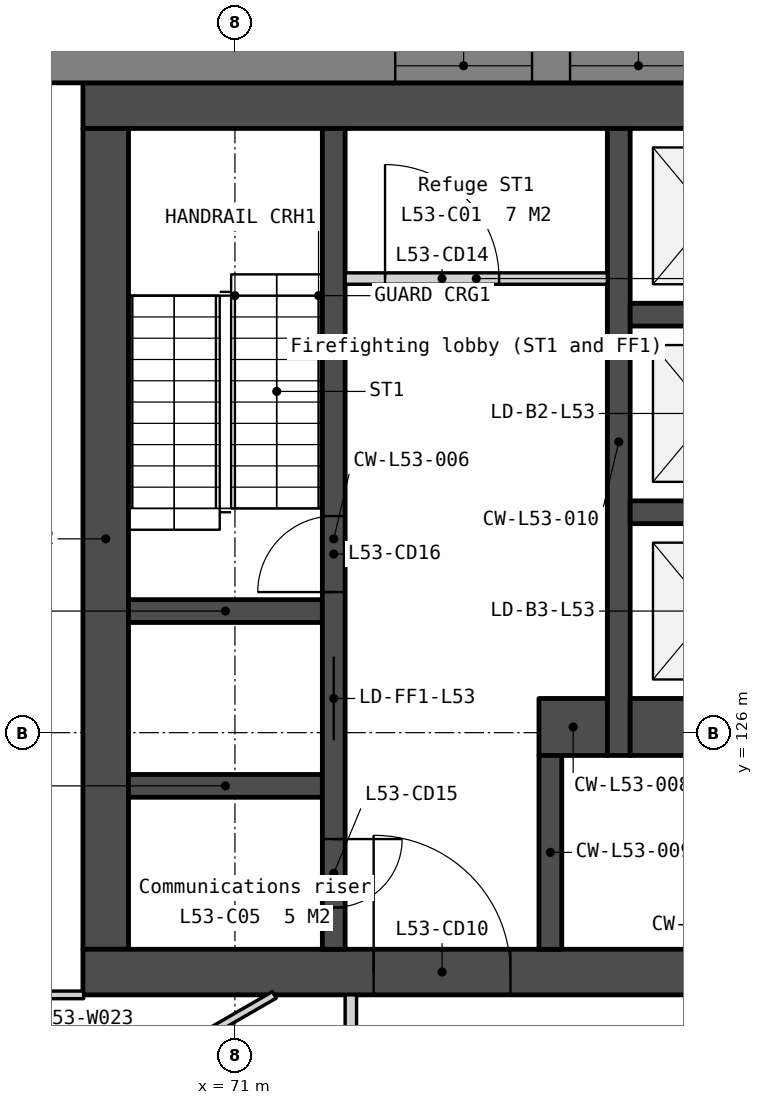
"""IFC4 building model, lengths in metres.
Left out: names, types, materials, properties, quantities, classifications, styles, units other than length and angle.
Written with IfcOpenShell. Run it as: python <this file> out.ifc"""

import sys

from ifc_helpers import new_model, si_unit, direction, frame, frame_2d, origin, place, context, subcontext, project, spatial, polyline, rectangle, outline, extrude, element, fill, save


model = new_model("IFC4")
c1 = context("Model", 3, precision=1e-05, world=origin(), true_north=direction((0.0, 1.0)))
c2 = subcontext(c1, "Body", "Model", "MODEL_VIEW")
j1 = project(units=[si_unit("LENGTHUNIT", "METRE"), si_unit("PLANEANGLEUNIT", "RADIAN")], contexts=[c1])
p1 = place(None, origin())
s1 = spatial("IfcSite", under=j1, at=p1, CompositionType="ELEMENT")
p2 = place(p1, origin())
s2 = spatial("IfcBuilding", under=s1, at=p2, CompositionType="ELEMENT")
p3 = place(p2, frame((0.0, 0.0, 211.4)))
s3 = spatial("IfcBuildingStorey", under=s2, at=p3, CompositionType="ELEMENT", Elevation=211.4)
p4 = place(p3, frame((69.0, 134.25, 0.0), z_axis=(0.0, 0.0, 1.0), x_axis=(1.0, 0.0, 0.0)))
e1 = element("IfcWall", 1, at=p4, inside=s3, PredefinedType="SOLIDWALL", context=c2, shape_type="SweptSolid", body=[
    extrude(rectangle(XDim=22.0, YDim=0.6, at=frame_2d((11.0, 0.0))), origin(), (0.0, 0.0, 1.0), 3.75),
])
p5 = place(p3, frame((69.3, 133.95, 0.0), z_axis=(0.0, 0.0, 1.0), x_axis=(0.0, -1.0, 0.0)))
e2 = element("IfcWall", 2, at=p5, inside=s3, PredefinedType="SOLIDWALL", context=c2, shape_type="SweptSolid", body=[
    extrude(rectangle(XDim=10.8, YDim=0.6, at=frame_2d((5.4, 0.0))), origin(), (0.0, 0.0, 1.0), 3.75),
])
p6 = place(p3, frame((69.0, 122.85, 0.0), z_axis=(0.0, 0.0, 1.0), x_axis=(1.0, 0.0, 0.0)))
e3 = element("IfcWall", 3, at=p6, inside=s3, PredefinedType="SOLIDWALL", context=c2, shape_type="SweptSolid", body=[
    extrude(rectangle(XDim=22.0, YDim=0.6, at=frame_2d((11.0, 0.0))), origin(), (0.0, 0.0, 1.0), 3.75),
])
p7 = place(p6, frame((16.375, 0.0, 0.0)))
e4 = element("IfcOpeningElement", 4, at=p7, cuts=e3, PredefinedType="OPENING", context=c2, shape_type="SweptSolid", body=[
    extrude(rectangle(XDim=1.8, YDim=2.1, at=frame_2d((0.9, 1.05))), frame((0.0, 0.31, 0.0), z_axis=(0.0, -1.0, 0.0), x_axis=(1.0, 0.0, 0.0)), (0.0, 0.0, 1.0), 0.62),
])
p8 = place(p6, frame((3.825, 0.0, 0.0)))
e5 = element("IfcOpeningElement", 5, at=p8, cuts=e3, PredefinedType="OPENING", context=c2, shape_type="SweptSolid", body=[
    extrude(rectangle(XDim=1.8, YDim=2.1, at=frame_2d((0.9, 1.05))), frame((0.0, 0.31, 0.0), z_axis=(0.0, -1.0, 0.0), x_axis=(1.0, 0.0, 0.0)), (0.0, 0.0, 1.0), 0.62),
])
p9 = place(p6, frame((12.85, 0.0, 0.0)))
e6 = element("IfcOpeningElement", 6, at=p9, cuts=e3, PredefinedType="OPENING", context=c2, shape_type="SweptSolid", body=[
    extrude(rectangle(XDim=1.5, YDim=2.1, at=frame_2d((0.75, 1.05))), frame((0.0, 0.31, 0.0), z_axis=(0.0, -1.0, 0.0), x_axis=(1.0, 0.0, 0.0)), (0.0, 0.0, 1.0), 0.62),
])
for number, where, z_axis, x_axis in (
    (7, (69.6, 127.6, 0.0), (0.0, 0.0, 1.0), (1.0, 0.0, 0.0)),
    (8, (69.6, 125.3, 0.0), (0.0, 0.0, 1.0), (1.0, 0.0, 0.0)),
):
    element("IfcWall", number, at=place(p3, frame(where, z_axis=z_axis, x_axis=x_axis)), inside=s3, PredefinedType="SOLIDWALL", context=c2, shape_type="SweptSolid", body=[
        extrude(rectangle(XDim=2.55, YDim=0.3, at=frame_2d((1.275, 0.0))), origin(), (0.0, 0.0, 1.0), 3.75),
    ])
p10 = place(p3, frame((72.3, 133.95, 0.0), z_axis=(0.0, 0.0, 1.0), x_axis=(0.0, -1.0, 0.0)))
e9 = element("IfcWall", 9, at=p10, inside=s3, PredefinedType="SOLIDWALL", context=c2, shape_type="SweptSolid", body=[
    extrude(rectangle(XDim=10.8, YDim=0.3, at=frame_2d((5.4, 0.0))), origin(), (0.0, 0.0, 1.0), 3.75),
])
p11 = place(p10, frame((6.95, 0.0, 0.0)))
e10 = element("IfcOpeningElement", 10, at=p11, cuts=e9, PredefinedType="OPENING", context=c2, shape_type="SweptSolid", body=[
    extrude(rectangle(XDim=1.1, YDim=2.1, at=frame_2d((0.55, 1.05))), frame((0.0, 0.16, 0.0), z_axis=(0.0, -1.0, 0.0), x_axis=(1.0, 0.0, 0.0)), (0.0, 0.0, 1.0), 0.32),
])
p12 = place(p10, frame((9.35, 0.0, 0.0)))
e11 = element("IfcOpeningElement", 11, at=p12, cuts=e9, PredefinedType="OPENING", context=c2, shape_type="SweptSolid", body=[
    extrude(rectangle(XDim=0.9, YDim=2.1, at=frame_2d((0.45, 1.05))), frame((0.0, 0.16, 0.0), z_axis=(0.0, -1.0, 0.0), x_axis=(1.0, 0.0, 0.0)), (0.0, 0.0, 1.0), 0.32),
])
p13 = place(p10, frame((5.1, 0.0, 0.0)))
e12 = element("IfcOpeningElement", 12, at=p13, cuts=e9, PredefinedType="OPENING", context=c2, shape_type="SweptSolid", body=[
    extrude(rectangle(XDim=1.0, YDim=2.1, at=frame_2d((0.5, 1.05))), frame((0.0, 0.16, 0.0), z_axis=(0.0, -1.0, 0.0), x_axis=(1.0, 0.0, 0.0)), (0.0, 0.0, 1.0), 0.32),
])
p14 = place(p3, frame((72.45, 131.975, 0.0), z_axis=(0.0, 0.0, 1.0), x_axis=(1.0, 0.0, 0.0)))
e13 = element("IfcWall", 13, at=p14, inside=s3, PredefinedType="PARTITIONING", context=c2, shape_type="SweptSolid", body=[
    extrude(rectangle(XDim=3.45, YDim=0.15, at=frame_2d((1.725, 0.0))), origin(), (0.0, 0.0, 1.0), 3.75),
])
p15 = place(p14, frame((0.525, 0.0, 0.0)))
e14 = element("IfcOpeningElement", 14, at=p15, cuts=e13, PredefinedType="OPENING", context=c2, shape_type="SweptSolid", body=[
    extrude(rectangle(XDim=1.5, YDim=2.1, at=frame_2d((0.75, 1.05))), frame((0.0, 0.085, 0.0), z_axis=(0.0, -1.0, 0.0), x_axis=(1.0, 0.0, 0.0)), (0.0, 0.0, 1.0), 0.17),
])
p16 = place(p3, frame((75.0, 126.075, 0.0), z_axis=(0.0, 0.0, 1.0), x_axis=(1.0, 0.0, 0.0)))
e15 = element("IfcWall", 15, at=p16, inside=s3, PredefinedType="SOLIDWALL", context=c2, shape_type="SweptSolid", body=[
    extrude(rectangle(XDim=0.9, YDim=0.75, at=frame_2d((0.45, 0.0))), origin(), (0.0, 0.0, 1.0), 3.75),
])
p17 = place(p3, frame((75.15, 125.7, 0.0), z_axis=(0.0, 0.0, 1.0), x_axis=(0.0, -1.0, 0.0)))
e16 = element("IfcWall", 16, at=p17, inside=s3, PredefinedType="SOLIDWALL", context=c2, shape_type="SweptSolid", body=[
    extrude(rectangle(XDim=2.55, YDim=0.3, at=frame_2d((1.275, 0.0))), origin(), (0.0, 0.0, 1.0), 3.75),
])
p18 = place(p3, frame((76.05, 133.95, 0.0), z_axis=(0.0, 0.0, 1.0), x_axis=(0.0, -1.0, 0.0)))
e17 = element("IfcWall", 17, at=p18, inside=s3, PredefinedType="SOLIDWALL", context=c2, shape_type="SweptSolid", body=[
    extrude(rectangle(XDim=8.25, YDim=0.3, at=frame_2d((4.125, 0.0))), origin(), (0.0, 0.0, 1.0), 3.75),
])
for number, where, z_axis, x_axis in (
    (18, (76.2, 131.5, 0.0), (0.0, 0.0, 1.0), (1.0, 0.0, 0.0)),
    (19, (76.2, 128.9, 0.0), (0.0, 0.0, 1.0), (1.0, 0.0, 0.0)),
):
    element("IfcWall", number, at=place(p3, frame(where, z_axis=z_axis, x_axis=x_axis)), inside=s3, PredefinedType="SOLIDWALL", context=c2, shape_type="SweptSolid", body=[
        extrude(rectangle(XDim=2.1, YDim=0.3, at=frame_2d((1.05, 0.0))), origin(), (0.0, 0.0, 1.0), 3.75),
    ])
p19 = place(p3, frame((76.2, 126.075, 0.0), z_axis=(0.0, 0.0, 1.0), x_axis=(1.0, 0.0, 0.0)))
e20 = element("IfcWall", 20, at=p19, inside=s3, PredefinedType="SOLIDWALL", context=c2, shape_type="SweptSolid", body=[
    extrude(rectangle(XDim=2.1, YDim=0.75, at=frame_2d((1.05, 0.0))), origin(), (0.0, 0.0, 1.0), 3.75),
])
p20 = place(p3, frame((99.365, 134.775, -0.15), z_axis=(0.0, 0.0, 1.0), x_axis=(-1.0, 0.0, 0.0)))
e21 = element("IfcWall", 21, at=p20, inside=s3, PredefinedType="SOLIDWALL", context=c2, shape_type="SweptSolid", body=[
    extrude(outline(polyline([(38.729, 0.0), (38.729, 3.9), (0.0, 3.9), (0.0, 0.0), (38.729, 0.0)])), frame((0.0, 0.225, 0.0), z_axis=(0.0, -1.0, 0.0), x_axis=(1.0, 0.0, 0.0)), (0.0, 0.0, 1.0), 0.45),
])
p21 = place(p20, frame((2.791, 0.0, 0.95)))
e22 = element("IfcOpeningElement", 22, at=p21, cuts=e21, PredefinedType="OPENING", context=c2, shape_type="SweptSolid", body=[
    extrude(rectangle(XDim=1.8, YDim=2.2, at=frame_2d((0.9, 1.1))), frame((0.0, 0.235, 0.0), z_axis=(0.0, -1.0, 0.0), x_axis=(1.0, 0.0, 0.0)), (0.0, 0.0, 1.0), 0.47),
])
p22 = place(p20, frame((5.091, 0.0, 0.95)))
e23 = element("IfcOpeningElement", 23, at=p22, cuts=e21, PredefinedType="OPENING", context=c2, shape_type="SweptSolid", body=[
    extrude(rectangle(XDim=1.8, YDim=2.2, at=frame_2d((0.9, 1.1))), frame((0.0, 0.235, 0.0), z_axis=(0.0, -1.0, 0.0), x_axis=(1.0, 0.0, 0.0)), (0.0, 0.0, 1.0), 0.47),
])
p23 = place(p20, frame((12.473, 0.0, 0.95)))
e24 = element("IfcOpeningElement", 24, at=p23, cuts=e21, PredefinedType="OPENING", context=c2, shape_type="SweptSolid", body=[
    extrude(rectangle(XDim=1.8, YDim=2.2, at=frame_2d((0.9, 1.1))), frame((0.0, 0.235, 0.0), z_axis=(0.0, -1.0, 0.0), x_axis=(1.0, 0.0, 0.0)), (0.0, 0.0, 1.0), 0.47),
])
p24 = place(p20, frame((14.773, 0.0, 0.95)))
e25 = element("IfcOpeningElement", 25, at=p24, cuts=e21, PredefinedType="OPENING", context=c2, shape_type="SweptSolid", body=[
    extrude(rectangle(XDim=1.8, YDim=2.2, at=frame_2d((0.9, 1.1))), frame((0.0, 0.235, 0.0), z_axis=(0.0, -1.0, 0.0), x_axis=(1.0, 0.0, 0.0)), (0.0, 0.0, 1.0), 0.47),
])
p25 = place(p20, frame((22.156, 0.0, 0.95)))
e26 = element("IfcOpeningElement", 26, at=p25, cuts=e21, PredefinedType="OPENING", context=c2, shape_type="SweptSolid", body=[
    extrude(rectangle(XDim=1.8, YDim=2.2, at=frame_2d((0.9, 1.1))), frame((0.0, 0.235, 0.0), z_axis=(0.0, -1.0, 0.0), x_axis=(1.0, 0.0, 0.0)), (0.0, 0.0, 1.0), 0.47),
])
p26 = place(p20, frame((24.456, 0.0, 0.95)))
e27 = element("IfcOpeningElement", 27, at=p26, cuts=e21, PredefinedType="OPENING", context=c2, shape_type="SweptSolid", body=[
    extrude(rectangle(XDim=1.8, YDim=2.2, at=frame_2d((0.9, 1.1))), frame((0.0, 0.235, 0.0), z_axis=(0.0, -1.0, 0.0), x_axis=(1.0, 0.0, 0.0)), (0.0, 0.0, 1.0), 0.47),
])
p27 = place(p20, frame((31.838, 0.0, 0.95)))
e28 = element("IfcOpeningElement", 28, at=p27, cuts=e21, PredefinedType="OPENING", context=c2, shape_type="SweptSolid", body=[
    extrude(rectangle(XDim=1.8, YDim=2.2, at=frame_2d((0.9, 1.1))), frame((0.0, 0.235, 0.0), z_axis=(0.0, -1.0, 0.0), x_axis=(1.0, 0.0, 0.0)), (0.0, 0.0, 1.0), 0.47),
])
p28 = place(p20, frame((34.138, 0.0, 0.95)))
e29 = element("IfcOpeningElement", 29, at=p28, cuts=e21, PredefinedType="OPENING", context=c2, shape_type="SweptSolid", body=[
    extrude(rectangle(XDim=1.8, YDim=2.2, at=frame_2d((0.9, 1.1))), frame((0.0, 0.235, 0.0), z_axis=(0.0, -1.0, 0.0), x_axis=(1.0, 0.0, 0.0)), (0.0, 0.0, 1.0), 0.47),
])
p29 = place(p3, frame((59.13, 132.168, -0.15), z_axis=(0.0, 0.0, 1.0), x_axis=(0.500002199942, -0.866024133644, 0.0)))
e30 = element("IfcWall", 30, at=p29, inside=s3, PredefinedType="SOLIDWALL", context=c2, shape_type="SweptSolid", body=[
    extrude(outline(polyline([(38.729, 0.0), (38.729, 3.9), (0.0, 3.9), (0.0, 0.0), (38.729, 0.0)])), frame((0.0, 0.225, 0.0), z_axis=(0.0, -1.0, 0.0), x_axis=(1.0, 0.0, 0.0)), (0.0, 0.0, 1.0), 0.45),
])
p30 = place(p29, frame((2.791, 0.0, 0.95)))
e31 = element("IfcOpeningElement", 31, at=p30, cuts=e30, PredefinedType="OPENING", context=c2, shape_type="SweptSolid", body=[
    extrude(rectangle(XDim=1.8, YDim=2.2, at=frame_2d((0.9, 1.1))), frame((0.0, 0.235, 0.0), z_axis=(0.0, -1.0, 0.0), x_axis=(1.0, 0.0, 0.0)), (0.0, 0.0, 1.0), 0.47),
])
p31 = place(p29, frame((5.091, 0.0, 0.95)))
e32 = element("IfcOpeningElement", 32, at=p31, cuts=e30, PredefinedType="OPENING", context=c2, shape_type="SweptSolid", body=[
    extrude(rectangle(XDim=1.8, YDim=2.2, at=frame_2d((0.9, 1.1))), frame((0.0, 0.235, 0.0), z_axis=(0.0, -1.0, 0.0), x_axis=(1.0, 0.0, 0.0)), (0.0, 0.0, 1.0), 0.47),
])
p32 = place(p29, frame((12.473, 0.0, 0.95)))
e33 = element("IfcOpeningElement", 33, at=p32, cuts=e30, PredefinedType="OPENING", context=c2, shape_type="SweptSolid", body=[
    extrude(rectangle(XDim=1.8, YDim=2.2, at=frame_2d((0.9, 1.1))), frame((0.0, 0.235, 0.0), z_axis=(0.0, -1.0, 0.0), x_axis=(1.0, 0.0, 0.0)), (0.0, 0.0, 1.0), 0.47),
])
p33 = place(p29, frame((14.773, 0.0, 0.95)))
e34 = element("IfcOpeningElement", 34, at=p33, cuts=e30, PredefinedType="OPENING", context=c2, shape_type="SweptSolid", body=[
    extrude(rectangle(XDim=1.8, YDim=2.2, at=frame_2d((0.9, 1.1))), frame((0.0, 0.235, 0.0), z_axis=(0.0, -1.0, 0.0), x_axis=(1.0, 0.0, 0.0)), (0.0, 0.0, 1.0), 0.47),
])
p34 = place(p29, frame((22.156, 0.0, 0.95)))
e35 = element("IfcOpeningElement", 35, at=p34, cuts=e30, PredefinedType="OPENING", context=c2, shape_type="SweptSolid", body=[
    extrude(rectangle(XDim=1.8, YDim=2.2, at=frame_2d((0.9, 1.1))), frame((0.0, 0.235, 0.0), z_axis=(0.0, -1.0, 0.0), x_axis=(1.0, 0.0, 0.0)), (0.0, 0.0, 1.0), 0.47),
])
p35 = place(p29, frame((24.456, 0.0, 0.95)))
e36 = element("IfcOpeningElement", 36, at=p35, cuts=e30, PredefinedType="OPENING", context=c2, shape_type="SweptSolid", body=[
    extrude(rectangle(XDim=1.8, YDim=2.2, at=frame_2d((0.9, 1.1))), frame((0.0, 0.235, 0.0), z_axis=(0.0, -1.0, 0.0), x_axis=(1.0, 0.0, 0.0)), (0.0, 0.0, 1.0), 0.47),
])
p36 = place(p29, frame((31.838, 0.0, 0.95)))
e37 = element("IfcOpeningElement", 37, at=p36, cuts=e30, PredefinedType="OPENING", context=c2, shape_type="SweptSolid", body=[
    extrude(rectangle(XDim=1.8, YDim=2.2, at=frame_2d((0.9, 1.1))), frame((0.0, 0.235, 0.0), z_axis=(0.0, -1.0, 0.0), x_axis=(1.0, 0.0, 0.0)), (0.0, 0.0, 1.0), 0.47),
])
p37 = place(p29, frame((34.138, 0.0, 0.95)))
e38 = element("IfcOpeningElement", 38, at=p37, cuts=e30, PredefinedType="OPENING", context=c2, shape_type="SweptSolid", body=[
    extrude(rectangle(XDim=1.8, YDim=2.2, at=frame_2d((0.9, 1.1))), frame((0.0, 0.235, 0.0), z_axis=(0.0, -1.0, 0.0), x_axis=(1.0, 0.0, 0.0)), (0.0, 0.0, 1.0), 0.47),
])
p38 = place(p3, frame((66.587, 119.703, 0.0), z_axis=(0.0, 0.0, 1.0), x_axis=(0.866023511746, 0.500003277092, 0.0)))
e39 = element("IfcWall", 39, at=p38, inside=s3, PredefinedType="PARTITIONING", context=c2, shape_type="SweptSolid", body=[
    extrude(rectangle(XDim=5.694, YDim=0.1, at=frame_2d((2.847, 0.0))), origin(), (0.0, 0.0, 1.0), 3.75),
])
p39 = place(p38, frame((2.397, 0.0, 0.0)))
e40 = element("IfcOpeningElement", 40, at=p39, cuts=e39, PredefinedType="OPENING", context=c2, shape_type="SweptSolid", body=[
    extrude(rectangle(XDim=0.9, YDim=2.1, at=frame_2d((0.45, 1.05))), frame((0.0, 0.06, 0.0), z_axis=(0.0, -1.0, 0.0), x_axis=(1.0, 0.0, 0.0)), (0.0, 0.0, 1.0), 0.12),
])
p40 = place(p3, frame((72.525, 119.875, 0.0), z_axis=(0.0, 0.0, 1.0), x_axis=(0.0, 1.0, 0.0)))
e41 = element("IfcWall", 41, at=p40, inside=s3, PredefinedType="PARTITIONING", context=c2, shape_type="SweptSolid", body=[
    extrude(rectangle(XDim=2.675, YDim=0.15, at=frame_2d((1.337, 0.0))), origin(), (0.0, 0.0, 1.0), 3.75),
])
p41 = place(p3, frame((66.952, 122.55, 0.0), z_axis=(0.0, 0.0, 1.0), x_axis=(1.0, 0.0, 0.0)))
e42 = element("IfcWall", 42, at=p41, inside=s3, PredefinedType="PARTITIONING", context=c2, shape_type="SweptSolid", body=[
    extrude(rectangle(XDim=2.058, YDim=0.1, at=frame_2d((1.029, 0.0))), origin(), (0.0, 0.0, 1.0), 3.75),
])
p42 = place(p11, origin())
e43 = element("IfcDoor", 43, at=p42, inside=s3, OperationType="SLIDING_TO_LEFT", PredefinedType="DOOR", context=c2, shape_type="SweptSolid", body=[
    extrude(rectangle(XDim=1.1, YDim=2.1, at=frame_2d((0.55, 1.05))), frame((0.0, 0.025, 0.0), z_axis=(0.0, -1.0, 0.0), x_axis=(1.0, 0.0, 0.0)), (0.0, 0.0, 1.0), 0.05),
])
fill(e10, e43)
p43 = place(p8, origin())
e44 = element("IfcDoor", 44, at=p43, inside=s3, OperationType="DOUBLE_DOOR_DOUBLE_SWING", PredefinedType="DOOR", context=c2, shape_type="SweptSolid", body=[
    extrude(rectangle(XDim=1.8, YDim=2.1, at=frame_2d((0.9, 1.05))), frame((0.0, 0.025, 0.0), z_axis=(0.0, -1.0, 0.0), x_axis=(1.0, 0.0, 0.0)), (0.0, 0.0, 1.0), 0.05),
])
fill(e5, e44)
p44 = place(p15, origin())
e45 = element("IfcDoor", 45, at=p44, inside=s3, OperationType="DOUBLE_DOOR_DOUBLE_SWING", PredefinedType="DOOR", context=c2, shape_type="SweptSolid", body=[
    extrude(rectangle(XDim=1.5, YDim=2.1, at=frame_2d((0.75, 1.05))), frame((0.0, 0.025, 0.0), z_axis=(0.0, -1.0, 0.0), x_axis=(1.0, 0.0, 0.0)), (0.0, 0.0, 1.0), 0.05),
])
fill(e14, e45)
p45 = place(p12, origin())
e46 = element("IfcDoor", 46, at=p45, inside=s3, OperationType="SINGLE_SWING_LEFT", PredefinedType="DOOR", context=c2, shape_type="SweptSolid", body=[
    extrude(rectangle(XDim=0.9, YDim=2.1, at=frame_2d((0.45, 1.05))), frame((0.0, 0.025, 0.0), z_axis=(0.0, -1.0, 0.0), x_axis=(1.0, 0.0, 0.0)), (0.0, 0.0, 1.0), 0.05),
])
fill(e11, e46)
p46 = place(p13, origin())
e47 = element("IfcDoor", 47, at=p46, inside=s3, OperationType="SINGLE_SWING_RIGHT", PredefinedType="DOOR", context=c2, shape_type="SweptSolid", body=[
    extrude(rectangle(XDim=1.0, YDim=2.1, at=frame_2d((0.5, 1.05))), frame((0.0, 0.025, 0.0), z_axis=(0.0, -1.0, 0.0), x_axis=(1.0, 0.0, 0.0)), (0.0, 0.0, 1.0), 0.05),
])
fill(e12, e47)
p47 = place(p25, origin())
e48 = element("IfcWindow", 48, at=p47, inside=s3, PartitioningType="SINGLE_PANEL", PredefinedType="WINDOW", context=c2, shape_type="SweptSolid", body=[
    extrude(rectangle(XDim=1.8, YDim=2.2, at=frame_2d((0.9, 1.1))), frame((0.0, 0.03, 0.0), z_axis=(0.0, -1.0, 0.0), x_axis=(1.0, 0.0, 0.0)), (0.0, 0.0, 1.0), 0.06),
])
fill(e26, e48)
p48 = place(p26, origin())
e49 = element("IfcWindow", 49, at=p48, inside=s3, PartitioningType="SINGLE_PANEL", PredefinedType="WINDOW", context=c2, shape_type="SweptSolid", body=[
    extrude(rectangle(XDim=1.8, YDim=2.2, at=frame_2d((0.9, 1.1))), frame((0.0, 0.03, 0.0), z_axis=(0.0, -1.0, 0.0), x_axis=(1.0, 0.0, 0.0)), (0.0, 0.0, 1.0), 0.06),
])
fill(e27, e49)
save(model, sys.argv[1])
